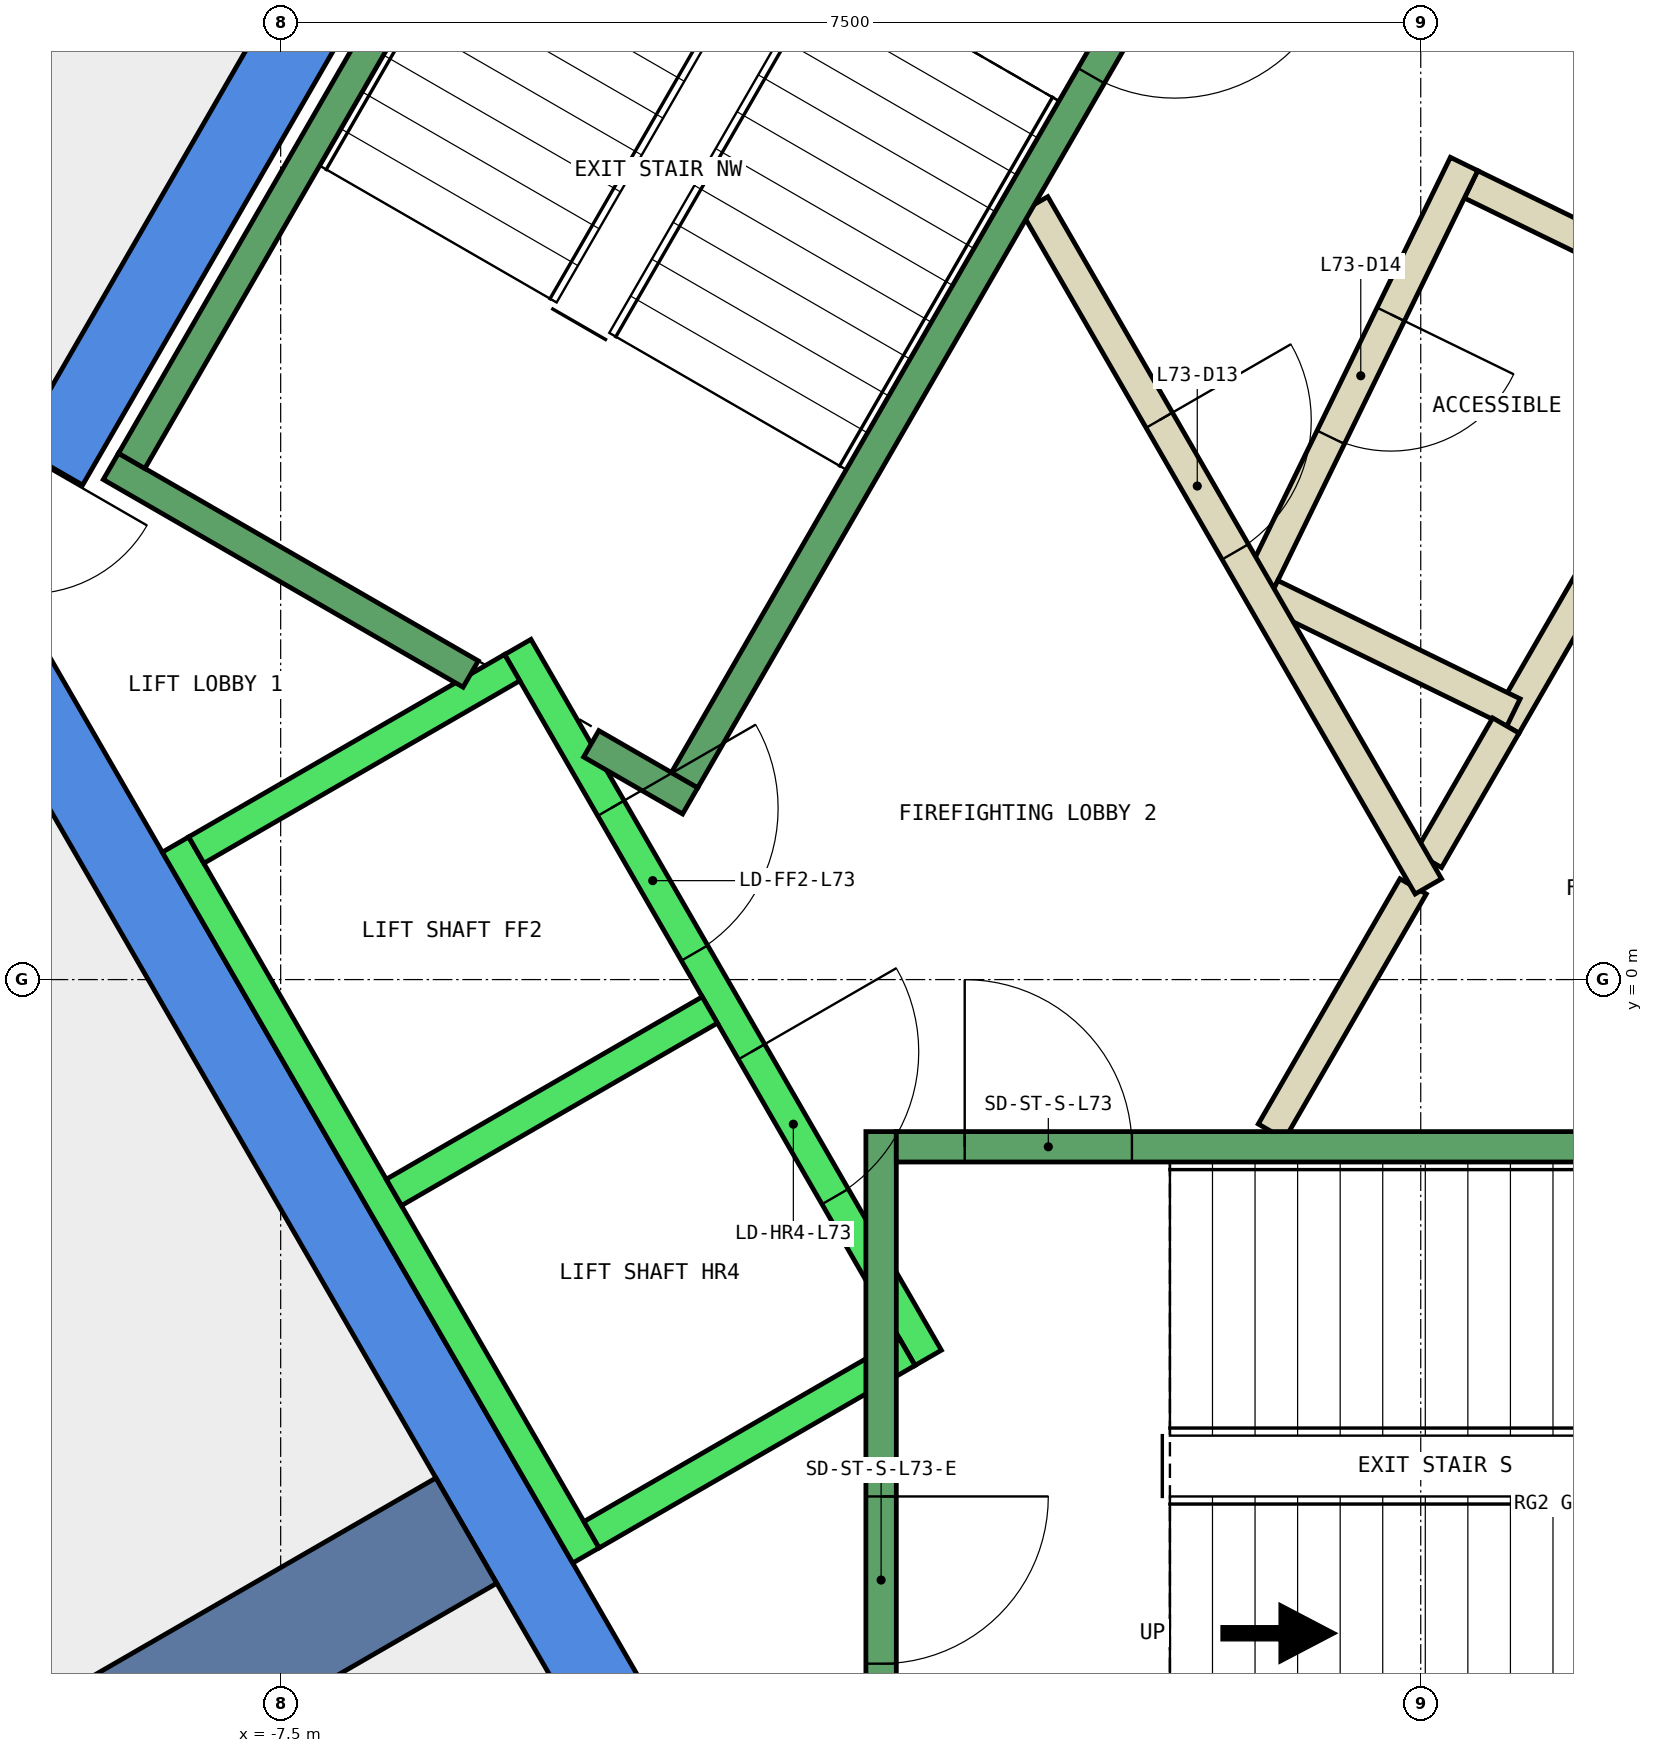
"""IFC4 building model, lengths in metres.
Left out: names, types, materials, properties, quantities, classifications, styles, units other than length and angle.
Written with IfcOpenShell. Run it as: python <this file> out.ifc"""

import sys

from ifc_helpers import new_model, si_unit, direction, frame, frame_2d, origin, place, context, subcontext, project, spatial, polyline, rectangle, outline, extrude, element, fill, save


model = new_model("IFC4")
c1 = context("Model", 3, precision=1e-05, world=origin(), true_north=direction((0.0, 1.0)))
c2 = subcontext(c1, "Body", "Model", "MODEL_VIEW")
j1 = project(units=[si_unit("LENGTHUNIT", "METRE"), si_unit("PLANEANGLEUNIT", "RADIAN")], contexts=[c1])
p1 = place(None, origin())
s1 = spatial("IfcSite", under=j1, at=p1, CompositionType="ELEMENT")
p2 = place(p1, origin())
s2 = spatial("IfcBuilding", under=s1, at=p2, CompositionType="ELEMENT")
p3 = place(p2, frame((0.0, 0.0, 311.6)))
s3 = spatial("IfcBuildingStorey", under=s2, at=p3, CompositionType="ELEMENT", Elevation=311.6)
p4 = place(p3, frame((0.0, 0.0, -0.34)))
e1 = element("IfcWall", 1, at=p4, inside=s3, PredefinedType="SHEAR", context=c2, shape_type="SweptSolid", body=[
    extrude(outline(polyline([(-9.236, 3.502), (-8.803, 3.253), (-4.619, 10.5), (-4.907, 11.0), (-9.236, 3.502)])), origin(), (0.0, 0.0, 1.0), 3.6),
])
p5 = place(p3, frame((0.0, 0.0, -0.34)))
e2 = element("IfcWall", 2, at=p5, inside=s3, PredefinedType="SHEAR", context=c2, shape_type="SweptSolid", body=[
    extrude(outline(polyline([(-9.815, 2.5), (-4.907, -6.0), (-4.619, -5.5), (-9.238, 2.5), (-9.815, 2.5)])), origin(), (0.0, 0.0, 1.0), 3.6),
])
p6 = place(p3, frame((-6.279, -3.625, -0.34), z_axis=(0.0, 0.0, 1.0), x_axis=(-0.866017533419, -0.500013631625, 0.0)))
e3 = element("IfcWall", 3, at=p6, inside=s3, PredefinedType="SHEAR", context=c2, shape_type="SweptSolid", body=[
    extrude(rectangle(XDim=9.0, YDim=0.8, at=frame_2d((4.5, 0.0))), origin(), (0.0, 0.0, 1.0), 3.6),
])
p7 = place(p3, frame((0.56, 1.671, 0.0), z_axis=(0.0, 0.0, 1.0), x_axis=(0.500008334558, 0.866020591771, 0.0)))
e4 = element("IfcWall", 4, at=p7, inside=s3, PredefinedType="PARTITIONING", context=c2, shape_type="SweptSolid", body=[
    extrude(rectangle(XDim=2.538, YDim=0.2, at=frame_2d((1.269, 0.0))), origin(), (0.0, 0.0, 1.0), 3.26),
])
p8 = place(p3, frame((2.128, 4.355, 0.0), z_axis=(0.0, 0.0, 1.0), x_axis=(-0.898876404494, 0.438202247191, 0.0)))
e5 = element("IfcWall", 5, at=p8, inside=s3, PredefinedType="PARTITIONING", context=c2, shape_type="SweptSolid", body=[
    extrude(rectangle(XDim=1.999, YDim=0.2, at=frame_2d((1.0, 0.0))), origin(), (0.0, 0.0, 1.0), 3.26),
])
p9 = place(p3, frame((0.285, 5.365, 0.0), z_axis=(0.0, 0.0, 1.0), x_axis=(-0.43840190643, -0.898779043168, 0.0)))
e6 = element("IfcWall", 6, at=p9, inside=s3, PredefinedType="PARTITIONING", context=c2, shape_type="SweptSolid", body=[
    extrude(rectangle(XDim=3.1, YDim=0.2, at=frame_2d((1.55, 0.0))), origin(), (0.0, 0.0, 1.0), 3.26),
])
p10 = place(p9, frame((1.1, 0.0, 0.0)))
e7 = element("IfcOpeningElement", 7, at=p10, cuts=e6, PredefinedType="OPENING", context=c2, shape_type="SweptSolid", body=[
    extrude(rectangle(XDim=0.9, YDim=2.1, at=frame_2d((0.45, 1.05))), frame((0.0, 0.11, 0.0), z_axis=(0.0, -1.0, 0.0), x_axis=(1.0, 0.0, 0.0)), (0.0, 0.0, 1.0), 0.22),
])
p11 = place(p3, frame((-0.984, 2.535, 0.0), z_axis=(0.0, 0.0, 1.0), x_axis=(0.898707583217, -0.438548378025, 0.0)))
e8 = element("IfcWall", 8, at=p11, inside=s3, PredefinedType="PARTITIONING", context=c2, shape_type="SweptSolid", body=[
    extrude(rectangle(XDim=1.774, YDim=0.2, at=frame_2d((0.887, 0.0))), origin(), (0.0, 0.0, 1.0), 3.26),
])
p12 = place(p3, frame((-12.701, 2.54, 0.0), z_axis=(0.0, 0.0, 1.0), x_axis=(0.499946799636, 0.86605611685, 0.0)))
e9 = element("IfcWall", 9, at=p12, inside=s3, PredefinedType="PARTITIONING", context=c2, shape_type="SweptSolid", body=[
    extrude(rectangle(XDim=8.227, YDim=0.2, at=frame_2d((4.114, 0.0))), origin(), (0.0, 0.0, 1.0), 3.26),
])
p13 = place(p12, frame((3.613, 0.0, 0.0)))
e10 = element("IfcOpeningElement", 10, at=p13, cuts=e9, PredefinedType="OPENING", context=c2, shape_type="SweptSolid", body=[
    extrude(rectangle(XDim=1.0, YDim=2.1, at=frame_2d((0.5, 1.05))), frame((0.0, 0.11, 0.0), z_axis=(0.0, -1.0, 0.0), x_axis=(1.0, 0.0, 0.0)), (0.0, 0.0, 1.0), 0.22),
])
p14 = place(p3, frame((-0.982, -1.0, 0.0), z_axis=(0.0, 0.0, 1.0), x_axis=(0.50024047865, 0.865886518847, 0.0)))
e11 = element("IfcWall", 11, at=p14, inside=s3, PredefinedType="PARTITIONING", context=c2, shape_type="SweptSolid", body=[
    extrude(rectangle(XDim=1.863, YDim=0.2, at=frame_2d((0.931, 0.0))), origin(), (0.0, 0.0, 1.0), 3.26),
])
p15 = place(p3, frame((0.05, 0.787, 0.0), z_axis=(0.0, 0.0, 1.0), x_axis=(0.499819111317, 0.866129814729, 0.0)))
e12 = element("IfcWall", 12, at=p15, inside=s3, PredefinedType="PARTITIONING", context=c2, shape_type="SweptSolid", body=[
    extrude(rectangle(XDim=1.021, YDim=0.2, at=frame_2d((0.51, 0.0))), origin(), (0.0, 0.0, 1.0), 3.26),
])
p16 = place(p3, frame((-2.54, 5.1, 0.0), z_axis=(0.0, 0.0, 1.0), x_axis=(0.499925051871, -0.866068670783, 0.0)))
e13 = element("IfcWall", 13, at=p16, inside=s3, PredefinedType="PARTITIONING", context=c2, shape_type="SweptSolid", body=[
    extrude(rectangle(XDim=5.181, YDim=0.2, at=frame_2d((2.59, 0.0))), origin(), (0.0, 0.0, 1.0), 3.26),
])
p17 = place(p16, frame((1.64, 0.0, 0.0)))
e14 = element("IfcOpeningElement", 14, at=p17, cuts=e13, PredefinedType="OPENING", context=c2, shape_type="SweptSolid", body=[
    extrude(rectangle(XDim=1.0, YDim=2.1, at=frame_2d((0.5, 1.05))), frame((0.0, 0.11, 0.0), z_axis=(0.0, -1.0, 0.0), x_axis=(1.0, 0.0, 0.0)), (0.0, 0.0, 1.0), 0.22),
])
p18 = place(p3, frame((-5.94, 2.188, 0.0), z_axis=(0.0, 0.0, 1.0), x_axis=(0.500034260056, -0.866005622828, 0.0)))
e15 = element("IfcWall", 15, at=p18, inside=s3, PredefinedType="STANDARD", context=c2, shape_type="SweptSolid", body=[
    extrude(rectangle(XDim=5.399, YDim=0.2, at=frame_2d((2.7, 0.0))), origin(), (0.0, 0.0, 1.0), 3.26),
])
p19 = place(p18, frame((3.075, 0.0, 0.0)))
e16 = element("IfcOpeningElement", 16, at=p19, cuts=e15, PredefinedType="OPENING", context=c2, shape_type="SweptSolid", body=[
    extrude(rectangle(XDim=1.1, YDim=2.1, at=frame_2d((0.55, 1.05))), frame((0.0, 0.11, 0.0), z_axis=(0.0, -1.0, 0.0), x_axis=(1.0, 0.0, 0.0)), (0.0, 0.0, 1.0), 0.22),
])
p20 = place(p18, frame((1.225, 0.0, 0.0)))
e17 = element("IfcOpeningElement", 17, at=p20, cuts=e15, PredefinedType="OPENING", context=c2, shape_type="SweptSolid", body=[
    extrude(rectangle(XDim=1.1, YDim=2.1, at=frame_2d((0.55, 1.05))), frame((0.0, 0.11, 0.0), z_axis=(0.0, -1.0, 0.0), x_axis=(1.0, 0.0, 0.0)), (0.0, 0.0, 1.0), 0.22),
])
p21 = place(p3, frame((-8.192, 0.888, 0.0), z_axis=(0.0, 0.0, 1.0), x_axis=(0.500034260056, -0.866005622828, 0.0)))
e18 = element("IfcWall", 18, at=p21, inside=s3, PredefinedType="STANDARD", context=c2, shape_type="SweptSolid", body=[
    extrude(rectangle(XDim=5.399, YDim=0.2, at=frame_2d((2.7, 0.0))), origin(), (0.0, 0.0, 1.0), 3.26),
])
for number, where, z_axis, x_axis in (
    (19, (-5.977, 2.052, 0.0), (0.0, 0.0, 1.0), (-0.866, -0.5, 0.0)),
    (20, (-4.677, -0.2, 0.0), (0.0, 0.0, 1.0), (-0.866, -0.5, 0.0)),
):
    element("IfcWall", number, at=place(p3, frame(where, z_axis=z_axis, x_axis=x_axis)), inside=s3, PredefinedType="STANDARD", context=c2, shape_type="SweptSolid", body=[
        extrude(rectangle(XDim=2.399, YDim=0.2, at=frame_2d((1.2, 0.0))), origin(), (0.0, 0.0, 1.0), 3.26),
    ])
p22 = place(p3, frame((-3.377, -2.452, 0.0), z_axis=(0.0, 0.0, 1.0), x_axis=(-0.865955154139, -0.50012165622, 0.0)))
e21 = element("IfcWall", 21, at=p22, inside=s3, PredefinedType="STANDARD", context=c2, shape_type="SweptSolid", body=[
    extrude(rectangle(XDim=2.4, YDim=0.2, at=frame_2d((1.2, 0.0))), origin(), (0.0, 0.0, 1.0), 3.26),
])
p23 = place(p3, frame((-3.55, -1.0, 0.0), z_axis=(0.0, 0.0, 1.0), x_axis=(0.0, -1.0, 0.0)))
e22 = element("IfcWall", 22, at=p23, inside=s3, PredefinedType="STANDARD", context=c2, shape_type="SweptSolid", body=[
    extrude(rectangle(XDim=4.4, YDim=0.2, at=frame_2d((2.2, 0.0))), origin(), (0.0, 0.0, 1.0), 3.26),
])
p24 = place(p23, frame((2.4, 0.0, 0.0)))
e23 = element("IfcOpeningElement", 23, at=p24, cuts=e22, PredefinedType="OPENING", context=c2, shape_type="SweptSolid", body=[
    extrude(rectangle(XDim=1.1, YDim=2.2, at=frame_2d((0.55, 1.1))), frame((0.0, 0.11, 0.0), z_axis=(0.0, -1.0, 0.0), x_axis=(1.0, 0.0, 0.0)), (0.0, 0.0, 1.0), 0.22),
])
p25 = place(p3, frame((-3.45, -1.1, 0.0), z_axis=(0.0, 0.0, 1.0), x_axis=(1.0, 0.0, 0.0)))
e24 = element("IfcWall", 24, at=p25, inside=s3, PredefinedType="STANDARD", context=c2, shape_type="SweptSolid", body=[
    extrude(rectangle(XDim=6.9, YDim=0.2, at=frame_2d((3.45, 0.0))), origin(), (0.0, 0.0, 1.0), 3.26),
])
p26 = place(p25, frame((0.45, 0.0, 0.0)))
e25 = element("IfcOpeningElement", 25, at=p26, cuts=e24, PredefinedType="OPENING", context=c2, shape_type="SweptSolid", body=[
    extrude(rectangle(XDim=1.1, YDim=2.2, at=frame_2d((0.55, 1.1))), frame((0.0, 0.11, 0.0), z_axis=(0.0, -1.0, 0.0), x_axis=(1.0, 0.0, 0.0)), (0.0, 0.0, 1.0), 0.22),
])
p27 = place(p3, frame((-6.25, 2.01, 0.0), z_axis=(0.0, 0.0, 1.0), x_axis=(-0.86611865017, 0.499838457731, 0.0)))
e26 = element("IfcWall", 26, at=p27, inside=s3, PredefinedType="STANDARD", context=c2, shape_type="SweptSolid", body=[
    extrude(rectangle(XDim=2.733, YDim=0.2, at=frame_2d((1.366, 0.0))), origin(), (0.0, 0.0, 1.0), 3.26),
])
p28 = place(p3, frame((-4.806, 1.176, 0.0), z_axis=(0.0, 0.0, 1.0), x_axis=(-0.866558586415, 0.499075361355, 0.0)))
e27 = element("IfcWall", 27, at=p28, inside=s3, PredefinedType="STANDARD", context=c2, shape_type="SweptSolid", body=[
    extrude(rectangle(XDim=0.751, YDim=0.2, at=frame_2d((0.376, 0.0))), origin(), (0.0, 0.0, 1.0), 3.26),
])
p29 = place(p3, frame((-1.393, 7.288, 0.0), z_axis=(0.0, 0.0, 1.0), x_axis=(-0.499963383562, -0.866046543262, 0.0)))
e28 = element("IfcWall", 28, at=p29, inside=s3, PredefinedType="STANDARD", context=c2, shape_type="SweptSolid", body=[
    extrude(rectangle(XDim=6.9, YDim=0.2, at=frame_2d((3.45, 0.0))), origin(), (0.0, 0.0, 1.0), 3.26),
])
p30 = place(p29, frame((0.45, 0.0, 0.0)))
e29 = element("IfcOpeningElement", 29, at=p30, cuts=e28, PredefinedType="OPENING", context=c2, shape_type="SweptSolid", body=[
    extrude(rectangle(XDim=1.1, YDim=2.2, at=frame_2d((0.55, 1.1))), frame((0.0, 0.11, 0.0), z_axis=(0.0, -1.0, 0.0), x_axis=(1.0, 0.0, 0.0)), (0.0, 0.0, 1.0), 0.22),
])
p31 = place(p3, frame((-5.03, 9.388, 0.0), z_axis=(0.0, 0.0, 1.0), x_axis=(-0.499978703459, -0.866037698999, 0.0)))
e30 = element("IfcWall", 30, at=p31, inside=s3, PredefinedType="STANDARD", context=c2, shape_type="SweptSolid", body=[
    extrude(rectangle(XDim=6.9, YDim=0.2, at=frame_2d((3.45, 0.0))), origin(), (0.0, 0.0, 1.0), 3.26),
])
p32 = place(p17, origin())
e31 = element("IfcDoor", 31, at=p32, inside=s3, OperationType="SINGLE_SWING_RIGHT", PredefinedType="DOOR", context=c2, shape_type="SweptSolid", body=[
    extrude(rectangle(XDim=1.0, YDim=2.1, at=frame_2d((0.5, 1.05))), frame((0.0, 0.025, 0.0), z_axis=(0.0, -1.0, 0.0), x_axis=(1.0, 0.0, 0.0)), (0.0, 0.0, 1.0), 0.05),
])
fill(e14, e31)
p33 = place(p10, origin())
e32 = element("IfcDoor", 32, at=p33, inside=s3, OperationType="SINGLE_SWING_RIGHT", PredefinedType="DOOR", context=c2, shape_type="SweptSolid", body=[
    extrude(rectangle(XDim=0.9, YDim=2.1, at=frame_2d((0.45, 1.05))), frame((0.0, 0.025, 0.0), z_axis=(0.0, -1.0, 0.0), x_axis=(1.0, 0.0, 0.0)), (0.0, 0.0, 1.0), 0.05),
])
fill(e7, e32)
p34 = place(p19, origin())
e33 = element("IfcDoor", 33, at=p34, inside=s3, OperationType="SLIDING_TO_LEFT", PredefinedType="DOOR", context=c2, shape_type="SweptSolid", body=[
    extrude(rectangle(XDim=1.1, YDim=2.1, at=frame_2d((0.55, 1.05))), frame((0.0, 0.025, 0.0), z_axis=(0.0, -1.0, 0.0), x_axis=(1.0, 0.0, 0.0)), (0.0, 0.0, 1.0), 0.05),
])
fill(e16, e33)
p35 = place(p20, origin())
e34 = element("IfcDoor", 34, at=p35, inside=s3, OperationType="SLIDING_TO_LEFT", PredefinedType="DOOR", context=c2, shape_type="SweptSolid", body=[
    extrude(rectangle(XDim=1.1, YDim=2.1, at=frame_2d((0.55, 1.05))), frame((0.0, 0.025, 0.0), z_axis=(0.0, -1.0, 0.0), x_axis=(1.0, 0.0, 0.0)), (0.0, 0.0, 1.0), 0.05),
])
fill(e17, e34)
p36 = place(p26, origin())
e35 = element("IfcDoor", 35, at=p36, inside=s3, OperationType="SINGLE_SWING_LEFT", PredefinedType="DOOR", context=c2, shape_type="SweptSolid", body=[
    extrude(rectangle(XDim=1.1, YDim=2.2, at=frame_2d((0.55, 1.1))), frame((0.0, 0.025, 0.0), z_axis=(0.0, -1.0, 0.0), x_axis=(1.0, 0.0, 0.0)), (0.0, 0.0, 1.0), 0.05),
])
fill(e25, e35)
p37 = place(p24, origin())
e36 = element("IfcDoor", 36, at=p37, inside=s3, OperationType="SINGLE_SWING_LEFT", PredefinedType="DOOR", context=c2, shape_type="SweptSolid", body=[
    extrude(rectangle(XDim=1.1, YDim=2.2, at=frame_2d((0.55, 1.1))), frame((0.0, 0.025, 0.0), z_axis=(0.0, -1.0, 0.0), x_axis=(1.0, 0.0, 0.0)), (0.0, 0.0, 1.0), 0.05),
])
fill(e23, e36)
p38 = place(p30, origin())
e37 = element("IfcDoor", 37, at=p38, inside=s3, OperationType="SINGLE_SWING_LEFT", PredefinedType="DOOR", context=c2, shape_type="SweptSolid", body=[
    extrude(rectangle(XDim=1.1, YDim=2.2, at=frame_2d((0.55, 1.1))), frame((0.0, 0.025, 0.0), z_axis=(0.0, -1.0, 0.0), x_axis=(1.0, 0.0, 0.0)), (0.0, 0.0, 1.0), 0.05),
])
fill(e29, e37)
save(model, sys.argv[1])
